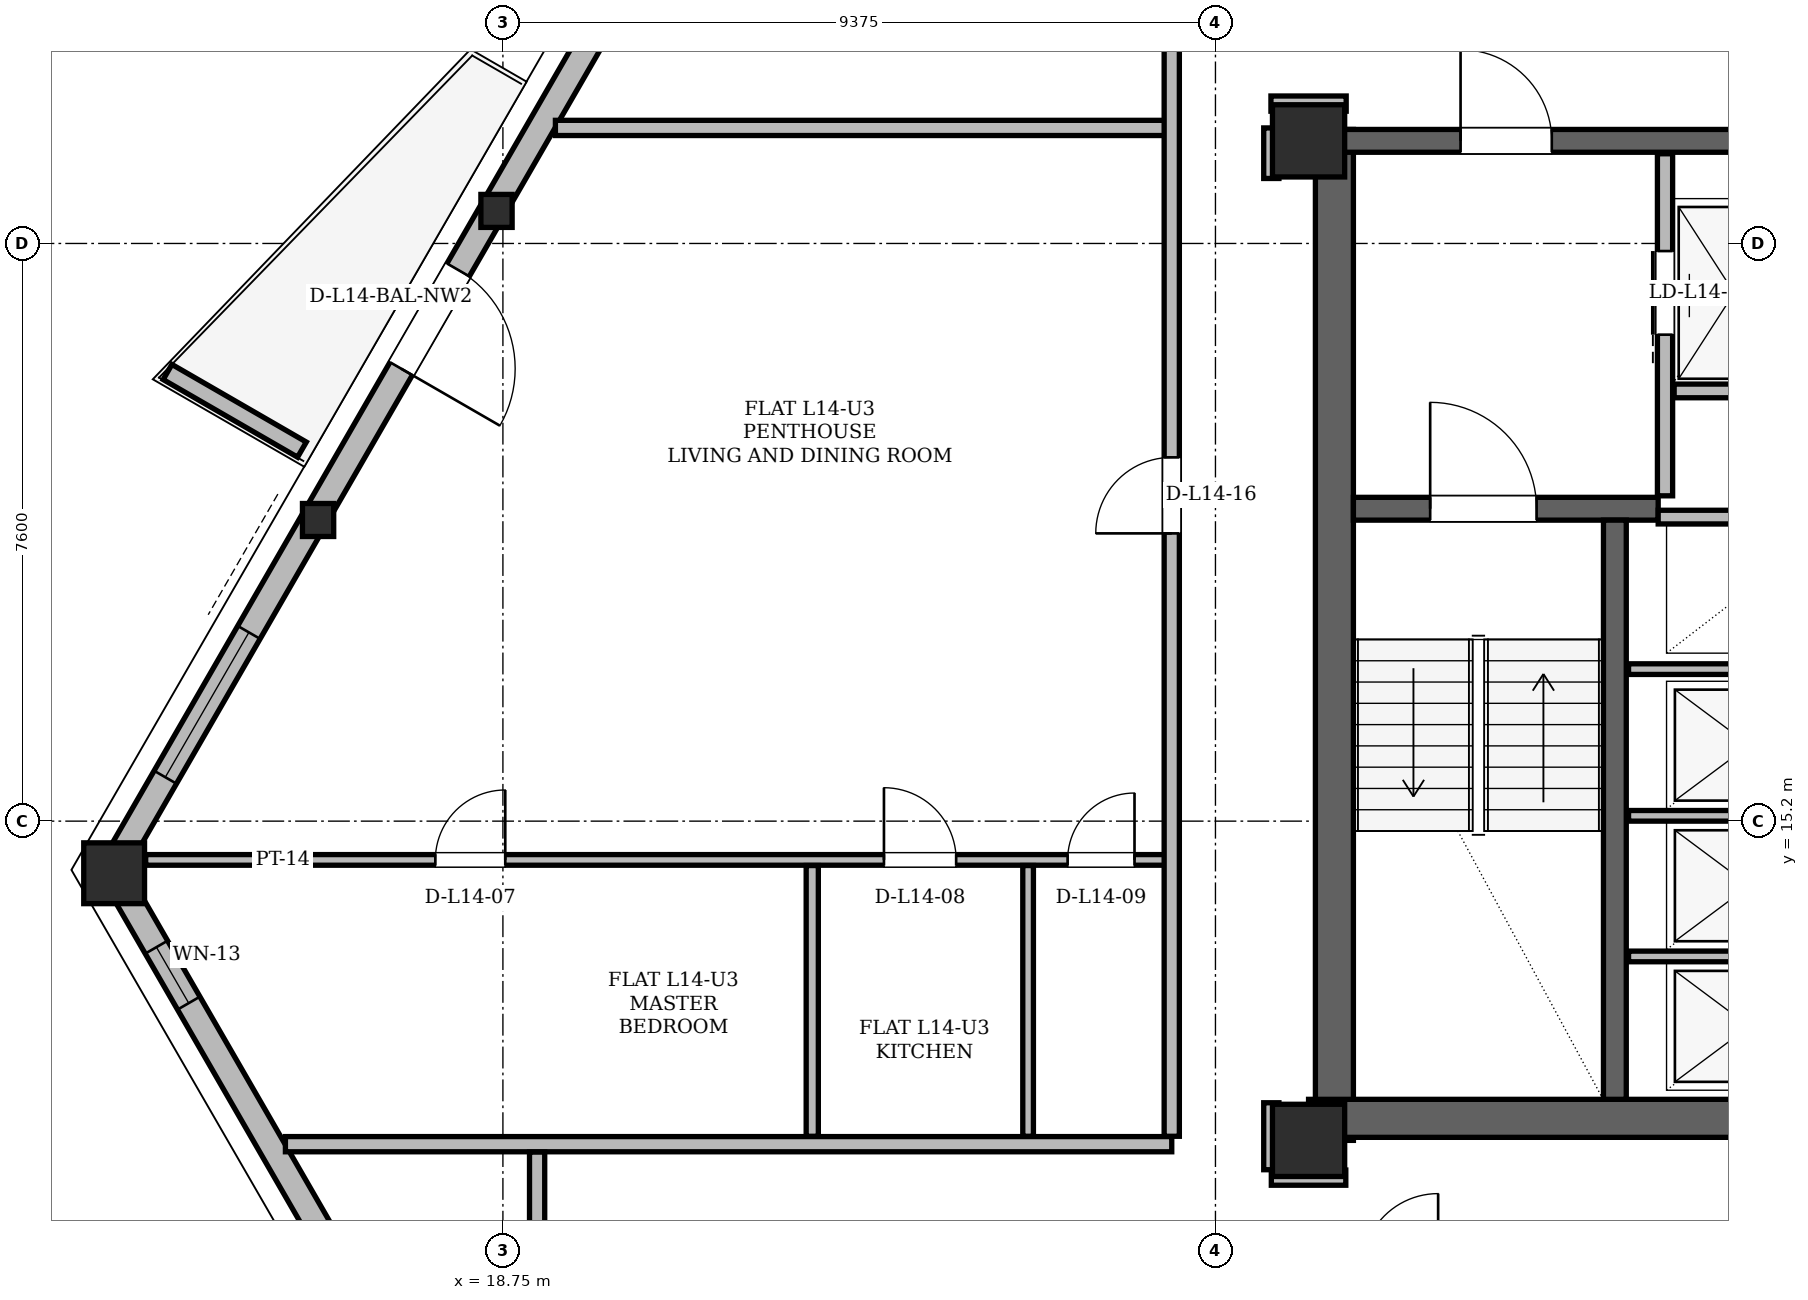
"""IFC4 building model, lengths in metres.
Left out: names, types, materials, properties, quantities, classifications, styles, units other than length and angle.
Written with IfcOpenShell. Run it as: python <this file> out.ifc"""

import sys

from ifc_helpers import new_model, si_unit, direction, frame, frame_2d, origin, origin_2d, place, context, subcontext, project, spatial, polyline, rectangle, hollow_rectangle, i_section, outline, extrude, element, fill, save


model = new_model("IFC4")
c1 = context("Model", 3, precision=1e-05, world=origin(), true_north=direction((0.0, 1.0)))
c2 = subcontext(c1, "Body", "Model", "MODEL_VIEW")
j1 = project(units=[si_unit("LENGTHUNIT", "METRE"), si_unit("PLANEANGLEUNIT", "RADIAN")], contexts=[c1])
p1 = place(None, origin())
s1 = spatial("IfcSite", under=j1, at=p1, CompositionType="ELEMENT")
p2 = place(p1, origin())
s2 = spatial("IfcBuilding", under=s1, at=p2, CompositionType="ELEMENT")
p3 = place(p2, frame((0.0, 0.0, 56.1)))
s3 = spatial("IfcBuildingStorey", under=s2, at=p3, CompositionType="ELEMENT", Elevation=56.1)
for number, where, z_axis, x_axis in (
    (1, (29.35, 11.0, 0.0), (0.0, 0.0, 1.0), (1.0, 0.0, 0.0)),
    (2, (29.35, 24.15, 0.0), (0.0, 0.0, 1.0), (1.0, 0.0, 0.0)),
):
    element("IfcColumn", number, at=place(p3, frame(where, z_axis=z_axis, x_axis=x_axis)), inside=s3, PredefinedType="COLUMN", context=c2, shape_type="SweptSolid", body=[
        extrude(hollow_rectangle(XDim=0.95, YDim=0.95, WallThickness=0.08, at=origin_2d()), origin(), (0.0, 0.0, 1.0), 3.6),
    ])
p4 = place(p3, frame((13.604, 14.559, 0.004), z_axis=(0.017192634037, -0.024531782164, 0.999551201789), x_axis=(0.818912078135, 0.573918991047, 0.0)))
e3 = element("IfcColumn", 3, at=p4, inside=s3, PredefinedType="COLUMN", context=c2, shape_type="SweptSolid", body=[
    extrude(hollow_rectangle(XDim=0.8, YDim=0.8, WallThickness=0.065, at=origin_2d()), origin(), (0.0, 0.0, 1.0), 3.593),
])
for number, where, z_axis, x_axis in (
    (4, (18.628, 23.26, 0.004), (0.021, -0.018, 1.0), (0.65, 0.76, 0.0)),
    (5, (16.284, 19.2, 0.004), (0.019, -0.021, 1.0), (0.74, 0.673, 0.0)),
):
    element("IfcColumn", number, at=place(p3, frame(where, z_axis=z_axis, x_axis=x_axis)), inside=s3, PredefinedType="COLUMN", context=c2, shape_type="SweptSolid", body=[
        extrude(i_section(OverallWidth=0.411, OverallDepth=0.434, WebThickness=0.036, FlangeThickness=0.057, at=origin_2d()), origin(), (0.0, 0.0, 1.0), 3.593),
    ])
p5 = place(p3, frame((29.69, 11.0, 0.0), z_axis=(0.0, 0.0, 1.0), x_axis=(0.0, 1.0, 0.0)))
e6 = element("IfcWall", 6, at=p5, inside=s3, PredefinedType="SHEAR", context=c2, shape_type="SweptSolid", body=[
    extrude(rectangle(XDim=13.3, YDim=0.5, at=frame_2d((6.65, 0.0))), origin(), (0.0, 0.0, 1.0), 3.36),
])
p6 = place(p3, frame((29.35, 11.29, 0.0), z_axis=(0.0, 0.0, 1.0), x_axis=(1.0, 0.0, 0.0)))
e7 = element("IfcWall", 7, at=p6, inside=s3, PredefinedType="SHEAR", context=c2, shape_type="SweptSolid", body=[
    extrude(rectangle(XDim=7.1, YDim=0.5, at=frame_2d((3.55, 0.0))), origin(), (0.0, 0.0, 1.0), 3.36),
])
p7 = place(p3, frame((29.65, 24.15, 0.0), z_axis=(0.0, 0.0, 1.0), x_axis=(1.0, 0.0, 0.0)))
e8 = element("IfcWall", 8, at=p7, inside=s3, PredefinedType="SHEAR", context=c2, shape_type="SweptSolid", body=[
    extrude(rectangle(XDim=15.7, YDim=0.3, at=frame_2d((7.85, 0.0))), origin(), (0.0, 0.0, 1.0), 3.36),
])
p8 = place(p7, frame((1.7, 0.0, 0.0)))
e9 = element("IfcOpeningElement", 9, at=p8, cuts=e8, PredefinedType="OPENING", context=c2, shape_type="SweptSolid", body=[
    extrude(rectangle(XDim=1.2, YDim=2.2, at=frame_2d((0.6, 1.1))), frame((0.0, 0.15, 0.0), z_axis=(0.0, -1.0, 0.0), x_axis=(1.0, 0.0, 0.0)), (0.0, 0.0, 1.0), 0.3),
])
p9 = place(p7, frame((12.8, 0.0, 0.0)))
e10 = element("IfcOpeningElement", 10, at=p9, cuts=e8, PredefinedType="OPENING", context=c2, shape_type="SweptSolid", body=[
    extrude(rectangle(XDim=1.2, YDim=2.2, at=frame_2d((0.6, 1.1))), frame((0.0, 0.15, 0.0), z_axis=(0.0, -1.0, 0.0), x_axis=(1.0, 0.0, 0.0)), (0.0, 0.0, 1.0), 0.3),
])
p10 = place(p7, frame((6.55, 0.0, 0.0)))
e11 = element("IfcOpeningElement", 11, at=p10, cuts=e8, PredefinedType="OPENING", context=c2, shape_type="SweptSolid", body=[
    extrude(rectangle(XDim=0.9, YDim=2.05, at=frame_2d((0.45, 1.025))), frame((0.0, 0.15, 0.0), z_axis=(0.0, -1.0, 0.0), x_axis=(1.0, 0.0, 0.0)), (0.0, 0.0, 1.0), 0.3),
])
p11 = place(p7, frame((8.45, 0.0, 0.0)))
e12 = element("IfcOpeningElement", 12, at=p11, cuts=e8, PredefinedType="OPENING", context=c2, shape_type="SweptSolid", body=[
    extrude(rectangle(XDim=0.9, YDim=2.05, at=frame_2d((0.45, 1.025))), frame((0.0, 0.15, 0.0), z_axis=(0.0, -1.0, 0.0), x_axis=(1.0, 0.0, 0.0)), (0.0, 0.0, 1.0), 0.3),
])
p12 = place(p3, frame((29.94, 19.31, 0.0), z_axis=(0.0, 0.0, 1.0), x_axis=(1.0, 0.0, 0.0)))
e13 = element("IfcWall", 13, at=p12, inside=s3, PredefinedType="SHEAR", context=c2, shape_type="SweptSolid", body=[
    extrude(rectangle(XDim=4.01, YDim=0.3, at=frame_2d((2.005, 0.0))), origin(), (0.0, 0.0, 1.0), 3.36),
])
p13 = place(p12, frame((1.01, 0.0, 0.0)))
e14 = element("IfcOpeningElement", 14, at=p13, cuts=e13, PredefinedType="OPENING", context=c2, shape_type="SweptSolid", body=[
    extrude(rectangle(XDim=1.4, YDim=2.2, at=frame_2d((0.7, 1.1))), frame((0.0, 0.15, 0.0), z_axis=(0.0, -1.0, 0.0), x_axis=(1.0, 0.0, 0.0)), (0.0, 0.0, 1.0), 0.3),
])
p14 = place(p3, frame((33.38, 11.54, 0.0), z_axis=(0.0, 0.0, 1.0), x_axis=(0.0, 1.0, 0.0)))
e15 = element("IfcWall", 15, at=p14, inside=s3, PredefinedType="SHEAR", context=c2, shape_type="SweptSolid", body=[
    extrude(rectangle(XDim=7.62, YDim=0.3, at=frame_2d((3.81, 0.0))), origin(), (0.0, 0.0, 1.0), 3.36),
])
p15 = place(p3, frame((13.604, 14.559, 0.0), z_axis=(0.0, 0.0, 1.0), x_axis=(0.500012153807, -0.866018386667, 0.0)))
e16 = element("IfcWall", 16, at=p15, inside=s3, PredefinedType="SOLIDWALL", context=c2, shape_type="SweptSolid", body=[
    extrude(rectangle(XDim=14.298, YDim=0.34, at=frame_2d((7.149, 0.0))), origin(), (0.0, 0.0, 1.0), 2.494),
])
p16 = place(p15, frame((1.174, 0.0, 1.28)))
e17 = element("IfcOpeningElement", 17, at=p16, cuts=e16, PredefinedType="OPENING", context=c2, shape_type="SweptSolid", body=[
    extrude(rectangle(XDim=0.85, YDim=0.92, at=frame_2d((0.425, 0.46))), frame((0.0, 0.17, 0.0), z_axis=(0.0, -1.0, 0.0), x_axis=(1.0, 0.0, 0.0)), (0.0, 0.0, 1.0), 0.34),
])
p17 = place(p3, frame((30.351, 43.565, 0.0), z_axis=(0.0, 0.0, 1.0), x_axis=(-0.500002389912, -0.866024023964, 0.0)))
e18 = element("IfcWall", 18, at=p17, inside=s3, PredefinedType="SOLIDWALL", context=c2, shape_type="SweptSolid", body=[
    extrude(rectangle(XDim=33.494, YDim=0.34, at=frame_2d((16.747, 0.0))), origin(), (0.0, 0.0, 1.0), 2.494),
])
p18 = place(p17, frame((6.159, 0.0, 0.0)))
e19 = element("IfcOpeningElement", 19, at=p18, cuts=e18, PredefinedType="OPENING", context=c2, shape_type="SweptSolid", body=[
    extrude(rectangle(XDim=1.5, YDim=2.2, at=frame_2d((0.75, 1.1))), frame((0.0, 0.17, 0.0), z_axis=(0.0, -1.0, 0.0), x_axis=(1.0, 0.0, 0.0)), (0.0, 0.0, 1.0), 0.34),
])
p19 = place(p17, frame((24.379, 0.0, 0.0)))
e20 = element("IfcOpeningElement", 20, at=p19, cuts=e18, PredefinedType="OPENING", context=c2, shape_type="SweptSolid", body=[
    extrude(rectangle(XDim=1.5, YDim=2.2, at=frame_2d((0.75, 1.1))), frame((0.0, 0.17, 0.0), z_axis=(0.0, -1.0, 0.0), x_axis=(1.0, 0.0, 0.0)), (0.0, 0.0, 1.0), 0.34),
])
p20 = place(p17, frame((29.886, 0.0, 0.85)))
e21 = element("IfcOpeningElement", 21, at=p20, cuts=e18, PredefinedType="OPENING", context=c2, shape_type="SweptSolid", body=[
    extrude(rectangle(XDim=2.2, YDim=1.534, at=frame_2d((1.1, 0.767))), frame((0.0, 0.17, 0.0), z_axis=(0.0, -1.0, 0.0), x_axis=(1.0, 0.0, 0.0)), (0.0, 0.0, 1.0), 0.34),
])
p21 = place(p17, frame((1.32, 0.0, 0.85)))
e22 = element("IfcOpeningElement", 22, at=p21, cuts=e18, PredefinedType="OPENING", context=c2, shape_type="SweptSolid", body=[
    extrude(rectangle(XDim=2.6, YDim=1.534, at=frame_2d((1.3, 0.767))), frame((0.0, 0.17, 0.0), z_axis=(0.0, -1.0, 0.0), x_axis=(1.0, 0.0, 0.0)), (0.0, 0.0, 1.0), 0.34),
])
p22 = place(p17, frame((16.806, 0.0, 0.85)))
e23 = element("IfcOpeningElement", 23, at=p22, cuts=e18, PredefinedType="OPENING", context=c2, shape_type="SweptSolid", body=[
    extrude(rectangle(XDim=2.0, YDim=1.534, at=frame_2d((1.0, 0.767))), frame((0.0, 0.17, 0.0), z_axis=(0.0, -1.0, 0.0), x_axis=(1.0, 0.0, 0.0)), (0.0, 0.0, 1.0), 0.34),
])
p23 = place(p3, frame((16.106, 20.088, 0.0), z_axis=(0.0, 0.0, 1.0), x_axis=(-0.866042246008, 0.499970827278, 0.0)))
e24 = element("IfcWall", 24, at=p23, inside=s3, PredefinedType="PARAPET", context=c2, shape_type="SweptSolid", body=[
    extrude(outline(polyline([(0.0, 0.0), (2.042, 0.0), (2.042, 1.1), (0.0, 1.32), (0.0, 0.0)])), frame((0.0, 0.115, 0.0), z_axis=(0.0, -1.0, 0.0), x_axis=(1.0, 0.0, 0.0)), (0.0, 0.0, 1.0), 0.23),
])
p24 = place(p3, frame((34.04, 19.48, 0.0), z_axis=(0.0, 0.0, 1.0), x_axis=(0.0, 1.0, 0.0)))
e25 = element("IfcWall", 25, at=p24, inside=s3, PredefinedType="PARTITIONING", context=c2, shape_type="SweptSolid", body=[
    extrude(rectangle(XDim=4.5, YDim=0.2, at=frame_2d((2.25, 0.0))), origin(), (0.0, 0.0, 1.0), 2.4),
])
p25 = place(p24, frame((2.12, 0.0, 0.0)))
e26 = element("IfcOpeningElement", 26, at=p25, cuts=e25, PredefinedType="OPENING", context=c2, shape_type="SweptSolid", body=[
    extrude(rectangle(XDim=1.1, YDim=2.2, at=frame_2d((0.55, 1.1))), frame((0.0, 0.1, 0.0), z_axis=(0.0, -1.0, 0.0), x_axis=(1.0, 0.0, 0.0)), (0.0, 0.0, 1.0), 0.2),
])
p26 = place(p3, frame((34.16, 20.86, 0.0), z_axis=(0.0, 0.0, 1.0), x_axis=(1.0, 0.0, 0.0)))
e27 = element("IfcWall", 27, at=p26, inside=s3, PredefinedType="PARTITIONING", context=c2, shape_type="SweptSolid", body=[
    extrude(rectangle(XDim=1.58, YDim=0.18, at=frame_2d((0.79, 0.0))), origin(), (0.0, 0.0, 1.0), 3.36),
])
p27 = place(p3, frame((33.95, 19.2, 0.0), z_axis=(0.0, 0.0, 1.0), x_axis=(1.0, 0.0, 0.0)))
e28 = element("IfcWall", 28, at=p27, inside=s3, PredefinedType="PARTITIONING", context=c2, shape_type="SweptSolid", body=[
    extrude(rectangle(XDim=2.27, YDim=0.18, at=frame_2d((1.135, 0.0))), origin(), (0.0, 0.0, 1.0), 3.36),
])
for number, where, z_axis, x_axis in (
    (29, (33.56, 13.42, 0.0), (0.0, 0.0, 1.0), (1.0, 0.0, 0.0)),
    (30, (33.56, 15.27, 0.0), (0.0, 0.0, 1.0), (1.0, 0.0, 0.0)),
    (31, (33.56, 17.2, 0.0), (0.0, 0.0, 1.0), (1.0, 0.0, 0.0)),
):
    element("IfcWall", number, at=place(p3, frame(where, z_axis=z_axis, x_axis=x_axis)), inside=s3, PredefinedType="PARTITIONING", context=c2, shape_type="SweptSolid", body=[
        extrude(rectangle(XDim=2.66, YDim=0.14, at=frame_2d((1.33, 0.0))), origin(), (0.0, 0.0, 1.0), 3.36),
    ])
p28 = place(p3, frame((28.86, 10.51, 0.0), z_axis=(0.0, 0.0, 1.0), x_axis=(1.0, 0.0, 0.0)))
e32 = element("IfcWall", 32, at=p28, inside=s3, PredefinedType="PARTITIONING", context=c2, shape_type="SweptSolid", body=[
    extrude(rectangle(XDim=0.98, YDim=0.2, at=frame_2d((0.49, 0.0))), origin(), (0.0, 0.0, 1.0), 2.738),
])
p29 = place(p3, frame((15.888, 10.95, 0.0), z_axis=(0.0, 0.0, 1.0), x_axis=(1.0, 0.0, 0.0)))
e33 = element("IfcWall", 33, at=p29, inside=s3, PredefinedType="PARTITIONING", context=c2, shape_type="SweptSolid", body=[
    extrude(rectangle(XDim=11.662, YDim=0.2, at=frame_2d((5.831, 0.0))), origin(), (0.0, 0.0, 1.0), 3.36),
])
p30 = place(p3, frame((14.05, 14.69, 0.0), z_axis=(0.0, 0.0, 1.0), x_axis=(1.0, 0.0, 0.0)))
e34 = element("IfcWall", 34, at=p30, inside=s3, PredefinedType="PARTITIONING", context=c2, shape_type="SweptSolid", body=[
    extrude(rectangle(XDim=13.55, YDim=0.14, at=frame_2d((6.775, 0.0))), origin(), (0.0, 0.0, 1.0), 2.946),
])
p31 = place(p30, frame((3.811, 0.0, 0.0)))
e35 = element("IfcOpeningElement", 35, at=p31, cuts=e34, PredefinedType="OPENING", context=c2, shape_type="SweptSolid", body=[
    extrude(rectangle(XDim=0.92, YDim=2.12, at=frame_2d((0.46, 1.06))), frame((0.0, 0.07, 0.0), z_axis=(0.0, -1.0, 0.0), x_axis=(1.0, 0.0, 0.0)), (0.0, 0.0, 1.0), 0.14),
])
p32 = place(p30, frame((9.713, 0.0, 0.0)))
e36 = element("IfcOpeningElement", 36, at=p32, cuts=e34, PredefinedType="OPENING", context=c2, shape_type="SweptSolid", body=[
    extrude(rectangle(XDim=0.95, YDim=2.1, at=frame_2d((0.475, 1.05))), frame((0.0, 0.07, 0.0), z_axis=(0.0, -1.0, 0.0), x_axis=(1.0, 0.0, 0.0)), (0.0, 0.0, 1.0), 0.14),
])
p33 = place(p30, frame((12.13, 0.0, 0.0)))
e37 = element("IfcOpeningElement", 37, at=p33, cuts=e34, PredefinedType="OPENING", context=c2, shape_type="SweptSolid", body=[
    extrude(rectangle(XDim=0.88, YDim=2.08, at=frame_2d((0.44, 1.04))), frame((0.0, 0.07, 0.0), z_axis=(0.0, -1.0, 0.0), x_axis=(1.0, 0.0, 0.0)), (0.0, 0.0, 1.0), 0.14),
])
p34 = place(p3, frame((19.441, 24.32, 0.0), z_axis=(0.0, 0.0, 1.0), x_axis=(1.0, 0.0, 0.0)))
e38 = element("IfcWall", 38, at=p34, inside=s3, PredefinedType="PARTITIONING", context=c2, shape_type="SweptSolid", body=[
    extrude(rectangle(XDim=8.109, YDim=0.2, at=frame_2d((4.055, 0.0))), origin(), (0.0, 0.0, 1.0), 2.494),
])
p35 = place(p3, frame((28.855, 24.64, 0.0), z_axis=(0.0, 0.0, 1.0), x_axis=(1.0, 0.0, 0.0)))
e39 = element("IfcWall", 39, at=p35, inside=s3, PredefinedType="PARTITIONING", context=c2, shape_type="SweptSolid", body=[
    extrude(rectangle(XDim=0.99, YDim=0.2, at=frame_2d((0.495, 0.0))), origin(), (0.0, 0.0, 1.0), 2.738),
])
p36 = place(p3, frame((19.2, 9.404, 0.0), z_axis=(0.0, 0.0, 1.0), x_axis=(0.0, 1.0, 0.0)))
e40 = element("IfcWall", 40, at=p36, inside=s3, PredefinedType="PARTITIONING", context=c2, shape_type="SweptSolid", body=[
    extrude(rectangle(XDim=1.442, YDim=0.2, at=frame_2d((0.721, 0.0))), origin(), (0.0, 0.0, 1.0), 3.36),
])
p37 = place(p3, frame((22.82, 11.054, 0.0), z_axis=(0.0, 0.0, 1.0), x_axis=(0.0, 1.0, 0.0)))
e41 = element("IfcWall", 41, at=p37, inside=s3, PredefinedType="PARTITIONING", context=c2, shape_type="SweptSolid", body=[
    extrude(rectangle(XDim=3.562, YDim=0.16, at=frame_2d((1.781, 0.0))), origin(), (0.0, 0.0, 1.0), 2.738),
])
p38 = place(p3, frame((25.66, 11.054, 0.0), z_axis=(0.0, 0.0, 1.0), x_axis=(0.0, 1.0, 0.0)))
e42 = element("IfcWall", 42, at=p38, inside=s3, PredefinedType="PARTITIONING", context=c2, shape_type="SweptSolid", body=[
    extrude(rectangle(XDim=3.562, YDim=0.14, at=frame_2d((1.781, 0.0))), origin(), (0.0, 0.0, 1.0), 2.738),
])
p39 = place(p3, frame((27.55, 11.054, 0.0), z_axis=(0.0, 0.0, 1.0), x_axis=(0.0, 1.0, 0.0)))
e43 = element("IfcWall", 43, at=p39, inside=s3, PredefinedType="PARTITIONING", context=c2, shape_type="SweptSolid", body=[
    extrude(rectangle(XDim=14.812, YDim=0.2, at=frame_2d((7.406, 0.0))), origin(), (0.0, 0.0, 1.0), 2.738),
])
p40 = place(p39, frame((7.932, 0.0, 0.0)))
e44 = element("IfcOpeningElement", 44, at=p40, cuts=e43, PredefinedType="OPENING", context=c2, shape_type="SweptSolid", body=[
    extrude(rectangle(XDim=1.0, YDim=2.18, at=frame_2d((0.5, 1.09))), frame((0.0, 0.1, 0.0), z_axis=(0.0, -1.0, 0.0), x_axis=(1.0, 0.0, 0.0)), (0.0, 0.0, 1.0), 0.2),
])
p41 = place(p3, frame((28.86, 10.614, 0.0), z_axis=(0.0, 0.0, 1.0), x_axis=(0.0, 1.0, 0.0)))
e45 = element("IfcWall", 45, at=p41, inside=s3, PredefinedType="PARTITIONING", context=c2, shape_type="SweptSolid", body=[
    extrude(rectangle(XDim=0.881, YDim=0.2, at=frame_2d((0.44, 0.0))), origin(), (0.0, 0.0, 1.0), 2.738),
])
p42 = place(p3, frame((28.86, 23.655, 0.0), z_axis=(0.0, 0.0, 1.0), x_axis=(0.0, 1.0, 0.0)))
e46 = element("IfcWall", 46, at=p42, inside=s3, PredefinedType="PARTITIONING", context=c2, shape_type="SweptSolid", body=[
    extrude(rectangle(XDim=0.665, YDim=0.2, at=frame_2d((0.333, 0.0))), origin(), (0.0, 0.0, 1.0), 2.946),
])
p43 = place(p19, origin())
e47 = element("IfcDoor", 47, at=p43, inside=s3, OperationType="SINGLE_SWING_RIGHT", PredefinedType="DOOR", context=c2, shape_type="SweptSolid", body=[
    extrude(rectangle(XDim=1.5, YDim=2.2, at=frame_2d((0.75, 1.1))), frame((0.0, 0.025, 0.0), z_axis=(0.0, -1.0, 0.0), x_axis=(1.0, 0.0, 0.0)), (0.0, 0.0, 1.0), 0.05),
])
fill(e20, e47)
p44 = place(p20, origin())
e48 = element("IfcWindow", 48, at=p44, inside=s3, PartitioningType="SINGLE_PANEL", PredefinedType="WINDOW", context=c2, shape_type="SweptSolid", body=[
    extrude(rectangle(XDim=2.2, YDim=1.534, at=frame_2d((1.1, 0.767))), frame((0.0, 0.03, 0.0), z_axis=(0.0, -1.0, 0.0), x_axis=(1.0, 0.0, 0.0)), (0.0, 0.0, 1.0), 0.06),
])
fill(e21, e48)
p45 = place(p16, origin())
e49 = element("IfcWindow", 49, at=p45, inside=s3, PartitioningType="SINGLE_PANEL", PredefinedType="WINDOW", context=c2, shape_type="SweptSolid", body=[
    extrude(rectangle(XDim=0.85, YDim=0.92, at=frame_2d((0.425, 0.46))), frame((0.0, 0.03, 0.0), z_axis=(0.0, -1.0, 0.0), x_axis=(1.0, 0.0, 0.0)), (0.0, 0.0, 1.0), 0.06),
])
fill(e17, e49)
p46 = place(p25, origin())
e50 = element("IfcDoor", 50, at=p46, inside=s3, OperationType="SLIDING_TO_LEFT", PredefinedType="DOOR", context=c2, shape_type="SweptSolid", body=[
    extrude(rectangle(XDim=1.1, YDim=2.2, at=frame_2d((0.55, 1.1))), frame((0.0, 0.025, 0.0), z_axis=(0.0, -1.0, 0.0), x_axis=(1.0, 0.0, 0.0)), (0.0, 0.0, 1.0), 0.05),
])
fill(e26, e50)
p47 = place(p13, origin())
e51 = element("IfcDoor", 51, at=p47, inside=s3, OperationType="SINGLE_SWING_LEFT", PredefinedType="DOOR", context=c2, shape_type="SweptSolid", body=[
    extrude(rectangle(XDim=1.4, YDim=2.2, at=frame_2d((0.7, 1.1))), frame((0.0, 0.025, 0.0), z_axis=(0.0, -1.0, 0.0), x_axis=(1.0, 0.0, 0.0)), (0.0, 0.0, 1.0), 0.05),
])
fill(e14, e51)
p48 = place(p8, origin())
e52 = element("IfcDoor", 52, at=p48, inside=s3, OperationType="SINGLE_SWING_LEFT", PredefinedType="DOOR", context=c2, shape_type="SweptSolid", body=[
    extrude(rectangle(XDim=1.2, YDim=2.2, at=frame_2d((0.6, 1.1))), frame((0.0, 0.025, 0.0), z_axis=(0.0, -1.0, 0.0), x_axis=(1.0, 0.0, 0.0)), (0.0, 0.0, 1.0), 0.05),
])
fill(e9, e52)
p49 = place(p31, origin())
e53 = element("IfcDoor", 53, at=p49, inside=s3, OperationType="SINGLE_SWING_RIGHT", PredefinedType="DOOR", context=c2, shape_type="SweptSolid", body=[
    extrude(rectangle(XDim=0.92, YDim=2.12, at=frame_2d((0.46, 1.06))), frame((0.0, 0.025, 0.0), z_axis=(0.0, -1.0, 0.0), x_axis=(1.0, 0.0, 0.0)), (0.0, 0.0, 1.0), 0.05),
])
fill(e35, e53)
p50 = place(p32, origin())
e54 = element("IfcDoor", 54, at=p50, inside=s3, OperationType="SINGLE_SWING_LEFT", PredefinedType="DOOR", context=c2, shape_type="SweptSolid", body=[
    extrude(rectangle(XDim=0.95, YDim=2.1, at=frame_2d((0.475, 1.05))), frame((0.0, 0.025, 0.0), z_axis=(0.0, -1.0, 0.0), x_axis=(1.0, 0.0, 0.0)), (0.0, 0.0, 1.0), 0.05),
])
fill(e36, e54)
p51 = place(p33, origin())
e55 = element("IfcDoor", 55, at=p51, inside=s3, OperationType="SINGLE_SWING_RIGHT", PredefinedType="DOOR", context=c2, shape_type="SweptSolid", body=[
    extrude(rectangle(XDim=0.88, YDim=2.08, at=frame_2d((0.44, 1.04))), frame((0.0, 0.025, 0.0), z_axis=(0.0, -1.0, 0.0), x_axis=(1.0, 0.0, 0.0)), (0.0, 0.0, 1.0), 0.05),
])
fill(e37, e55)
p52 = place(p40, origin())
e56 = element("IfcDoor", 56, at=p52, inside=s3, OperationType="SINGLE_SWING_LEFT", PredefinedType="DOOR", context=c2, shape_type="SweptSolid", body=[
    extrude(rectangle(XDim=1.0, YDim=2.18, at=frame_2d((0.5, 1.09))), frame((0.0, 0.025, 0.0), z_axis=(0.0, -1.0, 0.0), x_axis=(1.0, 0.0, 0.0)), (0.0, 0.0, 1.0), 0.05),
])
fill(e44, e56)
save(model, sys.argv[1])
